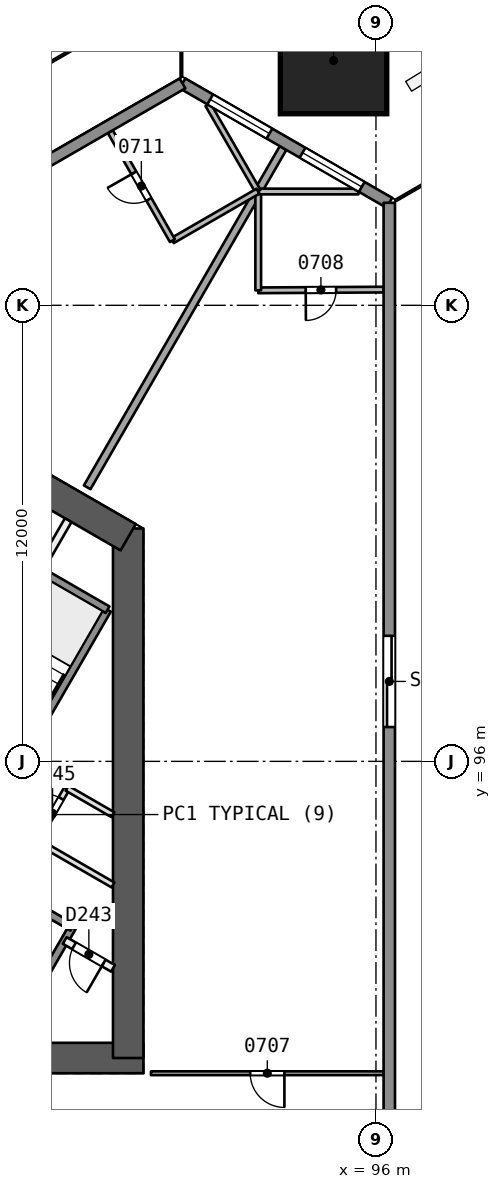
"""IFC4 building model, lengths in metres.
Left out: names, types, materials, properties, quantities, classifications, styles, units other than length and angle.
Written with IfcOpenShell. Run it as: python <this file> out.ifc"""

import sys

from ifc_helpers import new_model, si_unit, direction, frame, frame_2d, origin, origin_2d, place, context, subcontext, project, spatial, rectangle, extrude, element, fill, save


model = new_model("IFC4")
c1 = context("Model", 3, precision=1e-05, world=origin(), true_north=direction((0.0, 1.0)))
c2 = subcontext(c1, "Body", "Model", "MODEL_VIEW")
j1 = project(units=[si_unit("LENGTHUNIT", "METRE"), si_unit("PLANEANGLEUNIT", "RADIAN")], contexts=[c1])
p1 = place(None, origin())
s1 = spatial("IfcSite", under=j1, at=p1, CompositionType="ELEMENT")
p2 = place(p1, origin())
s2 = spatial("IfcBuilding", under=s1, at=p2, CompositionType="ELEMENT")
p3 = place(p2, frame((0.0, 0.0, 37.4)))
s3 = spatial("IfcBuildingStorey", under=s2, at=p3, CompositionType="ELEMENT", Elevation=37.4)
p4 = place(p3, frame((79.731, 88.194, 0.0), z_axis=(0.0, 0.0, 1.0), x_axis=(1.0, 0.0, 0.0)))
e1 = element("IfcWall", 1, at=p4, inside=s3, PredefinedType="SHEAR", context=c2, shape_type="SweptSolid", body=[
    extrude(rectangle(XDim=10.149, YDim=0.8, at=frame_2d((5.074, 0.0))), origin(), (0.0, 0.0, 1.0), 3.7),
])
p5 = place(p4, frame((0.719, 0.0, 0.0)))
e2 = element("IfcOpeningElement", 2, at=p5, cuts=e1, PredefinedType="OPENING", context=c2, shape_type="SweptSolid", body=[
    extrude(rectangle(XDim=1.2, YDim=2.1, at=frame_2d((0.6, 1.05))), frame((0.0, 0.411, 0.0), z_axis=(0.0, -1.0, 0.0), x_axis=(1.0, 0.0, 0.0)), (0.0, 0.0, 1.0), 0.821),
])
p6 = place(p3, frame((89.48, 88.194, 0.0), z_axis=(0.0, 0.0, 1.0), x_axis=(0.0, 1.0, 0.0)))
e3 = element("IfcWall", 3, at=p6, inside=s3, PredefinedType="SHEAR", context=c2, shape_type="SweptSolid", body=[
    extrude(rectangle(XDim=13.933, YDim=0.8, at=frame_2d((6.967, 0.0))), origin(), (0.0, 0.0, 1.0), 3.7),
])
p7 = place(p3, frame((89.48, 101.897, 0.0), z_axis=(0.0, 0.0, 1.0), x_axis=(-0.866034355626, 0.499984494636, 0.0)))
e4 = element("IfcWall", 4, at=p7, inside=s3, PredefinedType="SHEAR", context=c2, shape_type="SweptSolid", body=[
    extrude(rectangle(XDim=3.414, YDim=0.8, at=frame_2d((1.707, 0.0))), origin(), (0.0, 0.0, 1.0), 3.7),
])
p8 = place(p3, frame((94.905, 114.477, 0.0), z_axis=(-0.017605877014, -0.030464101799, 0.99938079409), x_axis=(0.86581098392, -0.500371202332, 2.456e-09)))
e5 = element("IfcColumn", 5, at=p8, inside=s3, PredefinedType="COLUMN", context=c2, shape_type="SweptSolid", body=[
    extrude(rectangle(XDim=2.8, YDim=2.8, at=origin_2d()), origin(), (0.0, 0.0, 1.0), 3.702),
])
p9 = place(p3, frame((96.202, 87.794, 0.0), z_axis=(0.0, 0.0, 1.0), x_axis=(-1.0, 0.0, 0.0)))
e6 = element("IfcWall", 6, at=p9, inside=s3, PredefinedType="PARTITIONING", context=c2, shape_type="SweptSolid", body=[
    extrude(rectangle(XDim=6.123, YDim=0.1, at=frame_2d((3.061, 0.0))), origin(), (0.0, 0.0, 1.0), 3.2),
])
p10 = place(p9, frame((2.611, 0.0, 0.0)))
e7 = element("IfcOpeningElement", 7, at=p10, cuts=e6, PredefinedType="OPENING", context=c2, shape_type="SweptSolid", body=[
    extrude(rectangle(XDim=0.9, YDim=2.1, at=frame_2d((0.45, 1.05))), frame((0.0, 0.061, 0.0), z_axis=(0.0, -1.0, 0.0), x_axis=(1.0, 0.0, 0.0)), (0.0, 0.0, 1.0), 0.121),
])
p11 = place(p3, frame((96.202, 108.413, 0.0), z_axis=(0.0, 0.0, 1.0), x_axis=(-0.999983351016, -0.005770415135, 0.0)))
e8 = element("IfcWall", 8, at=p11, inside=s3, PredefinedType="PARTITIONING", context=c2, shape_type="SweptSolid", body=[
    extrude(rectangle(XDim=3.3, YDim=0.15, at=frame_2d((1.65, 0.0))), origin(), (0.0, 0.0, 1.0), 3.2),
])
p12 = place(p11, frame((1.25, 0.0, 0.0)))
e9 = element("IfcOpeningElement", 9, at=p12, cuts=e8, PredefinedType="OPENING", context=c2, shape_type="SweptSolid", body=[
    extrude(rectangle(XDim=0.8, YDim=2.1, at=frame_2d((0.4, 1.05))), frame((0.0, 0.085, 0.0), z_axis=(0.0, -1.0, 0.0), x_axis=(1.0, 0.0, 0.0)), (0.0, 0.0, 1.0), 0.171),
])
p13 = place(p3, frame((92.902, 108.394, 0.0), z_axis=(0.0, 0.0, 1.0), x_axis=(0.0, 1.0, 0.0)))
e10 = element("IfcWall", 10, at=p13, inside=s3, PredefinedType="PARTITIONING", context=c2, shape_type="SweptSolid", body=[
    extrude(rectangle(XDim=2.6, YDim=0.15, at=frame_2d((1.3, 0.0))), origin(), (0.0, 0.0, 1.0), 3.2),
])
p14 = place(p3, frame((92.902, 110.994, 0.0), z_axis=(0.0, 0.0, 1.0), x_axis=(1.0, 0.0, 0.0)))
e11 = element("IfcWall", 11, at=p14, inside=s3, PredefinedType="PARTITIONING", context=c2, shape_type="SweptSolid", body=[
    extrude(rectangle(XDim=2.637, YDim=0.15, at=frame_2d((1.319, 0.0))), origin(), (0.0, 0.0, 1.0), 3.2),
])
p15 = place(p3, frame((93.556, 112.139, 0.0), z_axis=(0.0, 0.0, 1.0), x_axis=(-0.499997833203, -0.866026654782, 0.0)))
e12 = element("IfcWall", 12, at=p15, inside=s3, PredefinedType="PARTITIONING", context=c2, shape_type="SweptSolid", body=[
    extrude(rectangle(XDim=10.309, YDim=0.2, at=frame_2d((5.155, 0.0))), origin(), (0.0, 0.0, 1.0), 3.2),
])
p16 = place(p3, frame((91.579, 113.28, 0.0), z_axis=(0.0, 0.0, 1.0), x_axis=(0.500051830632, -0.865995477287, 0.0)))
e13 = element("IfcWall", 13, at=p16, inside=s3, PredefinedType="PARTITIONING", context=c2, shape_type="SweptSolid", body=[
    extrude(rectangle(XDim=2.631, YDim=0.15, at=frame_2d((1.315, 0.0))), origin(), (0.0, 0.0, 1.0), 3.2),
])
p17 = place(p3, frame((92.895, 111.002, 0.0), z_axis=(0.0, 0.0, 1.0), x_axis=(-0.866021400173, -0.500006934395, 0.0)))
e14 = element("IfcWall", 14, at=p17, inside=s3, PredefinedType="PARTITIONING", context=c2, shape_type="SweptSolid", body=[
    extrude(rectangle(XDim=2.6, YDim=0.15, at=frame_2d((1.3, 0.0))), origin(), (0.0, 0.0, 1.0), 3.2),
])
p18 = place(p3, frame((90.643, 109.702, 0.0), z_axis=(0.0, 0.0, 1.0), x_axis=(-0.494999221434, 0.868893417388, 0.0)))
e15 = element("IfcWall", 15, at=p18, inside=s3, PredefinedType="PARTITIONING", context=c2, shape_type="SweptSolid", body=[
    extrude(rectangle(XDim=3.3, YDim=0.15, at=frame_2d((1.65, 0.0))), origin(), (0.0, 0.0, 1.0), 3.2),
])
p19 = place(p18, frame((1.25, 0.0, 0.0)))
e16 = element("IfcOpeningElement", 16, at=p19, cuts=e15, PredefinedType="OPENING", context=c2, shape_type="SweptSolid", body=[
    extrude(rectangle(XDim=0.8, YDim=2.1, at=frame_2d((0.4, 1.05))), frame((0.0, 0.085, 0.0), z_axis=(0.0, -1.0, 0.0), x_axis=(1.0, 0.0, 0.0)), (0.0, 0.0, 1.0), 0.171),
])
p20 = place(p3, frame((90.91, 113.839, 0.0), z_axis=(0.0, 0.0, 1.0), x_axis=(0.866022511254, -0.500005009975, 0.0)))
e17 = element("IfcWall", 17, at=p20, inside=s3, PredefinedType="SOLIDWALL", context=c2, shape_type="SweptSolid", body=[
    extrude(rectangle(XDim=6.283, YDim=0.3, at=frame_2d((3.141, 0.0))), origin(), (0.0, 0.0, 1.0), 3.2),
])
p21 = place(p20, frame((3.646, 0.0, 0.9)))
e18 = element("IfcOpeningElement", 18, at=p21, cuts=e17, PredefinedType="OPENING", context=c2, shape_type="SweptSolid", body=[
    extrude(rectangle(XDim=1.8, YDim=1.5, at=frame_2d((0.9, 0.75))), frame((0.0, 0.161, 0.0), z_axis=(0.0, -1.0, 0.0), x_axis=(1.0, 0.0, 0.0)), (0.0, 0.0, 1.0), 0.321),
])
p22 = place(p20, frame((0.841, 0.0, 0.9)))
e19 = element("IfcOpeningElement", 19, at=p22, cuts=e17, PredefinedType="OPENING", context=c2, shape_type="SweptSolid", body=[
    extrude(rectangle(XDim=1.8, YDim=1.5, at=frame_2d((0.9, 0.75))), frame((0.0, 0.161, 0.0), z_axis=(0.0, -1.0, 0.0), x_axis=(1.0, 0.0, 0.0)), (0.0, 0.0, 1.0), 0.321),
])
p23 = place(p3, frame((96.351, 110.698, 0.0), z_axis=(0.0, 0.0, 1.0), x_axis=(0.0, -1.0, 0.0)))
e20 = element("IfcWall", 20, at=p23, inside=s3, PredefinedType="SOLIDWALL", context=c2, shape_type="SweptSolid", body=[
    extrude(rectangle(XDim=61.395, YDim=0.3, at=frame_2d((30.698, 0.0))), origin(), (0.0, 0.0, 1.0), 3.2),
])
p24 = place(p23, frame((29.498, 0.0, 0.0)))
e21 = element("IfcOpeningElement", 21, at=p24, cuts=e20, PredefinedType="OPENING", context=c2, shape_type="SweptSolid", body=[
    extrude(rectangle(XDim=2.4, YDim=2.4, at=frame_2d((1.2, 1.2))), frame((0.0, 0.161, 0.0), z_axis=(0.0, -1.0, 0.0), x_axis=(1.0, 0.0, 0.0)), (0.0, 0.0, 1.0), 0.321),
])
p25 = place(p23, frame((34.33, 0.0, 0.0)))
e22 = element("IfcOpeningElement", 22, at=p25, cuts=e20, PredefinedType="OPENING", context=c2, shape_type="SweptSolid", body=[
    extrude(rectangle(XDim=2.4, YDim=2.4, at=frame_2d((1.2, 1.2))), frame((0.0, 0.161, 0.0), z_axis=(0.0, -1.0, 0.0), x_axis=(1.0, 0.0, 0.0)), (0.0, 0.0, 1.0), 0.321),
])
p26 = place(p23, frame((47.603, 0.0, 0.0)))
e23 = element("IfcOpeningElement", 23, at=p26, cuts=e20, PredefinedType="OPENING", context=c2, shape_type="SweptSolid", body=[
    extrude(rectangle(XDim=2.4, YDim=2.4, at=frame_2d((1.2, 1.2))), frame((0.0, 0.161, 0.0), z_axis=(0.0, -1.0, 0.0), x_axis=(1.0, 0.0, 0.0)), (0.0, 0.0, 1.0), 0.321),
])
p27 = place(p23, frame((24.665, 0.0, 0.0)))
e24 = element("IfcOpeningElement", 24, at=p27, cuts=e20, PredefinedType="OPENING", context=c2, shape_type="SweptSolid", body=[
    extrude(rectangle(XDim=2.4, YDim=2.4, at=frame_2d((1.2, 1.2))), frame((0.0, 0.161, 0.0), z_axis=(0.0, -1.0, 0.0), x_axis=(1.0, 0.0, 0.0)), (0.0, 0.0, 1.0), 0.321),
])
p28 = place(p23, frame((11.394, 0.0, 0.0)))
e25 = element("IfcOpeningElement", 25, at=p28, cuts=e20, PredefinedType="OPENING", context=c2, shape_type="SweptSolid", body=[
    extrude(rectangle(XDim=2.4, YDim=2.4, at=frame_2d((1.2, 1.2))), frame((0.0, 0.161, 0.0), z_axis=(0.0, -1.0, 0.0), x_axis=(1.0, 0.0, 0.0)), (0.0, 0.0, 1.0), 0.321),
])
p29 = place(p3, frame((37.74, 83.141, 0.0), z_axis=(0.0, 0.0, 1.0), x_axis=(0.866026524777, 0.499998058379, 0.0)))
e26 = element("IfcWall", 26, at=p29, inside=s3, PredefinedType="SOLIDWALL", context=c2, shape_type="SweptSolid", body=[
    extrude(rectangle(XDim=61.395, YDim=0.3, at=frame_2d((30.698, 0.0))), origin(), (0.0, 0.0, 1.0), 3.2),
])
p30 = place(p29, frame((34.174, 0.0, 0.0)))
e27 = element("IfcOpeningElement", 27, at=p30, cuts=e26, PredefinedType="OPENING", context=c2, shape_type="SweptSolid", body=[
    extrude(rectangle(XDim=2.4, YDim=2.4, at=frame_2d((1.2, 1.2))), frame((0.0, 0.161, 0.0), z_axis=(0.0, -1.0, 0.0), x_axis=(1.0, 0.0, 0.0)), (0.0, 0.0, 1.0), 0.321),
])
p31 = place(p29, frame((47.603, 0.0, 0.0)))
e28 = element("IfcOpeningElement", 28, at=p31, cuts=e26, PredefinedType="OPENING", context=c2, shape_type="SweptSolid", body=[
    extrude(rectangle(XDim=2.4, YDim=2.4, at=frame_2d((1.2, 1.2))), frame((0.0, 0.161, 0.0), z_axis=(0.0, -1.0, 0.0), x_axis=(1.0, 0.0, 0.0)), (0.0, 0.0, 1.0), 0.321),
])
p32 = place(p29, frame((24.198, 0.0, 0.0)))
e29 = element("IfcOpeningElement", 29, at=p32, cuts=e26, PredefinedType="OPENING", context=c2, shape_type="SweptSolid", body=[
    extrude(rectangle(XDim=2.4, YDim=2.4, at=frame_2d((1.2, 1.2))), frame((0.0, 0.161, 0.0), z_axis=(0.0, -1.0, 0.0), x_axis=(1.0, 0.0, 0.0)), (0.0, 0.0, 1.0), 0.321),
])
p33 = place(p29, frame((11.394, 0.0, 0.0)))
e30 = element("IfcOpeningElement", 30, at=p33, cuts=e26, PredefinedType="OPENING", context=c2, shape_type="SweptSolid", body=[
    extrude(rectangle(XDim=2.4, YDim=2.4, at=frame_2d((1.2, 1.2))), frame((0.0, 0.161, 0.0), z_axis=(0.0, -1.0, 0.0), x_axis=(1.0, 0.0, 0.0)), (0.0, 0.0, 1.0), 0.321),
])
p34 = place(p29, frame((28.874, 0.0, 0.0)))
e31 = element("IfcOpeningElement", 31, at=p34, cuts=e26, PredefinedType="OPENING", context=c2, shape_type="SweptSolid", body=[
    extrude(rectangle(XDim=2.4, YDim=2.4, at=frame_2d((1.2, 1.2))), frame((0.0, 0.161, 0.0), z_axis=(0.0, -1.0, 0.0), x_axis=(1.0, 0.0, 0.0)), (0.0, 0.0, 1.0), 0.321),
])
p35 = place(p3, frame((86.77, 89.486, 0.0), z_axis=(0.0, 0.0, 1.0), x_axis=(0.499961042966, 0.86604789447, 0.0)))
e32 = element("IfcWall", 32, at=p35, inside=s3, PredefinedType="SOLIDWALL", context=c2, shape_type="SweptSolid", body=[
    extrude(rectangle(XDim=2.48, YDim=0.2, at=frame_2d((1.24, 0.0))), origin(), (0.0, 0.0, 1.0), 3.2),
])
p36 = place(p3, frame((87.071, 93.908, 0.0), z_axis=(0.0, 0.0, 1.0), x_axis=(0.499995408039, 0.866028054938, 0.0)))
e33 = element("IfcWall", 33, at=p36, inside=s3, PredefinedType="PARTITIONING", context=c2, shape_type="SweptSolid", body=[
    extrude(rectangle(XDim=1.6, YDim=0.15, at=frame_2d((0.8, 0.0))), origin(), (0.0, 0.0, 1.0), 3.2),
])
p37 = place(p36, frame((0.387, 0.0, 0.0)))
e34 = element("IfcOpeningElement", 34, at=p37, cuts=e33, PredefinedType="OPENING", context=c2, shape_type="SweptSolid", body=[
    extrude(rectangle(XDim=0.9, YDim=2.1, at=frame_2d((0.45, 1.05))), frame((0.0, 0.085, 0.0), z_axis=(0.0, -1.0, 0.0), x_axis=(1.0, 0.0, 0.0)), (0.0, 0.0, 1.0), 0.171),
])
p38 = place(p3, frame((85.087, 93.321, 0.0), z_axis=(0.0, 0.0, 1.0), x_axis=(0.500019787375, 0.866013979237, 0.0)))
e35 = element("IfcWall", 35, at=p38, inside=s3, PredefinedType="SOLIDWALL", context=c2, shape_type="SweptSolid", body=[
    extrude(rectangle(XDim=7.7, YDim=0.2, at=frame_2d((3.85, 0.0))), origin(), (0.0, 0.0, 1.0), 3.2),
])
p39 = place(p3, frame((87.09, 100.94, 0.0), z_axis=(0.0, 0.0, 1.0), x_axis=(0.499956811548, 0.866050337213, 0.0)))
e36 = element("IfcWall", 36, at=p39, inside=s3, PredefinedType="PARTITIONING", context=c2, shape_type="SweptSolid", body=[
    extrude(rectangle(XDim=1.623, YDim=0.2, at=frame_2d((0.812, 0.0))), origin(), (0.0, 0.0, 1.0), 3.2),
])
p40 = place(p3, frame((89.08, 90.554, 0.0), z_axis=(0.0, 0.0, 1.0), x_axis=(-0.866022048785, 0.500005810984, 0.0)))
e37 = element("IfcWall", 37, at=p40, inside=s3, PredefinedType="PARTITIONING", context=c2, shape_type="SweptSolid", body=[
    extrude(rectangle(XDim=1.467, YDim=0.2, at=frame_2d((0.733, 0.0))), origin(), (0.0, 0.0, 1.0), 3.2),
])
p41 = place(p40, frame((0.283, 0.0, 0.0)))
e38 = element("IfcOpeningElement", 38, at=p41, cuts=e37, PredefinedType="OPENING", context=c2, shape_type="SweptSolid", body=[
    extrude(rectangle(XDim=0.9, YDim=2.1, at=frame_2d((0.45, 1.05))), frame((0.0, 0.11, 0.0), z_axis=(0.0, -1.0, 0.0), x_axis=(1.0, 0.0, 0.0)), (0.0, 0.0, 1.0), 0.221),
])
p42 = place(p3, frame((88.01, 91.634, 0.0), z_axis=(0.0, 0.0, 1.0), x_axis=(-0.866024315419, 0.5000018851, 0.0)))
e39 = element("IfcWall", 39, at=p42, inside=s3, PredefinedType="SOLIDWALL", context=c2, shape_type="SweptSolid", body=[
    extrude(rectangle(XDim=9.0, YDim=0.2, at=frame_2d((4.5, 0.0))), origin(), (0.0, 0.0, 1.0), 3.2),
])
p43 = place(p3, frame((89.08, 92.748, 0.0), z_axis=(0.0, 0.0, 1.0), x_axis=(-0.866026103983, 0.499998787219, 0.0)))
e40 = element("IfcWall", 40, at=p43, inside=s3, PredefinedType="PARTITIONING", context=c2, shape_type="SweptSolid", body=[
    extrude(rectangle(XDim=2.32, YDim=0.15, at=frame_2d((1.16, 0.0))), origin(), (0.0, 0.0, 1.0), 3.2),
])
p44 = place(p3, frame((89.08, 94.595, 0.0), z_axis=(0.0, 0.0, 1.0), x_axis=(-0.866028321769, 0.499994945868, 0.0)))
e41 = element("IfcWall", 41, at=p44, inside=s3, PredefinedType="PARTITIONING", context=c2, shape_type="SweptSolid", body=[
    extrude(rectangle(XDim=1.396, YDim=0.15, at=frame_2d((0.698, 0.0))), origin(), (0.0, 0.0, 1.0), 3.2),
])
p45 = place(p3, frame((88.937, 99.99, 0.0), z_axis=(0.0, 0.0, 1.0), x_axis=(-0.866004344652, 0.500036473714, 0.0)))
e42 = element("IfcWall", 42, at=p45, inside=s3, PredefinedType="SOLIDWALL", context=c2, shape_type="SweptSolid", body=[
    extrude(rectangle(XDim=4.15, YDim=0.2, at=frame_2d((2.075, 0.0))), origin(), (0.0, 0.0, 1.0), 3.2),
])
p46 = place(p10, origin())
e43 = element("IfcDoor", 43, at=p46, inside=s3, OperationType="SINGLE_SWING_LEFT", PredefinedType="NOTDEFINED", context=c2, shape_type="SweptSolid", body=[
    extrude(rectangle(XDim=0.9, YDim=2.1, at=frame_2d((0.45, 1.05))), frame((0.0, 0.025, 0.0), z_axis=(0.0, -1.0, 0.0), x_axis=(1.0, 0.0, 0.0)), (0.0, 0.0, 1.0), 0.05),
])
fill(e7, e43)
p47 = place(p12, origin())
e44 = element("IfcDoor", 44, at=p47, inside=s3, OperationType="SINGLE_SWING_RIGHT", PredefinedType="NOTDEFINED", context=c2, shape_type="SweptSolid", body=[
    extrude(rectangle(XDim=0.8, YDim=2.1, at=frame_2d((0.4, 1.05))), frame((0.0, 0.025, 0.0), z_axis=(0.0, -1.0, 0.0), x_axis=(1.0, 0.0, 0.0)), (0.0, 0.0, 1.0), 0.05),
])
fill(e9, e44)
p48 = place(p19, origin())
e45 = element("IfcDoor", 45, at=p48, inside=s3, OperationType="SINGLE_SWING_RIGHT", PredefinedType="NOTDEFINED", context=c2, shape_type="SweptSolid", body=[
    extrude(rectangle(XDim=0.8, YDim=2.1, at=frame_2d((0.4, 1.05))), frame((0.0, 0.025, 0.0), z_axis=(0.0, -1.0, 0.0), x_axis=(1.0, 0.0, 0.0)), (0.0, 0.0, 1.0), 0.05),
])
fill(e16, e45)
p49 = place(p21, origin())
e46 = element("IfcWindow", 46, at=p49, inside=s3, PartitioningType="SINGLE_PANEL", PredefinedType="WINDOW", context=c2, shape_type="SweptSolid", body=[
    extrude(rectangle(XDim=1.8, YDim=1.5, at=frame_2d((0.9, 0.75))), frame((0.0, 0.03, 0.0), z_axis=(0.0, -1.0, 0.0), x_axis=(1.0, 0.0, 0.0)), (0.0, 0.0, 1.0), 0.06),
])
fill(e18, e46)
p50 = place(p22, origin())
e47 = element("IfcWindow", 47, at=p50, inside=s3, PartitioningType="SINGLE_PANEL", PredefinedType="WINDOW", context=c2, shape_type="SweptSolid", body=[
    extrude(rectangle(XDim=1.8, YDim=1.5, at=frame_2d((0.9, 0.75))), frame((0.0, 0.03, 0.0), z_axis=(0.0, -1.0, 0.0), x_axis=(1.0, 0.0, 0.0)), (0.0, 0.0, 1.0), 0.06),
])
fill(e19, e47)
p51 = place(p28, origin())
e48 = element("IfcDoor", 48, at=p51, inside=s3, OperationType="SLIDING_TO_LEFT", PredefinedType="NOTDEFINED", context=c2, shape_type="SweptSolid", body=[
    extrude(rectangle(XDim=2.4, YDim=2.4, at=frame_2d((1.2, 1.2))), frame((0.0, 0.025, 0.0), z_axis=(0.0, -1.0, 0.0), x_axis=(1.0, 0.0, 0.0)), (0.0, 0.0, 1.0), 0.05),
])
fill(e25, e48)
p52 = place(p41, origin())
e49 = element("IfcDoor", 49, at=p52, inside=s3, OperationType="SINGLE_SWING_LEFT", PredefinedType="NOTDEFINED", context=c2, shape_type="SweptSolid", body=[
    extrude(rectangle(XDim=0.9, YDim=2.1, at=frame_2d((0.45, 1.05))), frame((0.0, 0.025, 0.0), z_axis=(0.0, -1.0, 0.0), x_axis=(1.0, 0.0, 0.0)), (0.0, 0.0, 1.0), 0.05),
])
fill(e38, e49)
p53 = place(p37, origin())
e50 = element("IfcDoor", 50, at=p53, inside=s3, OperationType="SINGLE_SWING_LEFT", PredefinedType="NOTDEFINED", context=c2, shape_type="SweptSolid", body=[
    extrude(rectangle(XDim=0.9, YDim=2.1, at=frame_2d((0.45, 1.05))), frame((0.0, 0.025, 0.0), z_axis=(0.0, -1.0, 0.0), x_axis=(1.0, 0.0, 0.0)), (0.0, 0.0, 1.0), 0.05),
])
fill(e34, e50)
save(model, sys.argv[1])
